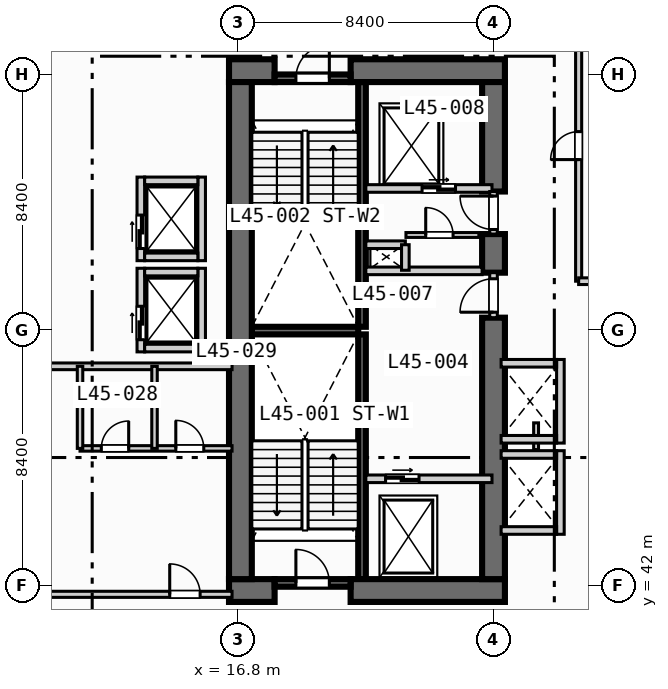
"""IFC4 building model, lengths in metres.
Left out: names, types, materials, properties, quantities, classifications, styles, units other than length and angle.
Written with IfcOpenShell. Run it as: python <this file> out.ifc"""

import sys

from ifc_helpers import new_model, si_unit, direction, frame, frame_2d, origin, place, context, subcontext, project, spatial, rectangle, extrude, element, fill, save


model = new_model("IFC4")
c1 = context("Model", 3, precision=1e-05, world=origin(), true_north=direction((0.0, 1.0)))
c2 = subcontext(c1, "Body", "Model", "MODEL_VIEW")
j1 = project(units=[si_unit("LENGTHUNIT", "METRE"), si_unit("PLANEANGLEUNIT", "RADIAN")], contexts=[c1])
p1 = place(None, origin())
s1 = spatial("IfcSite", under=j1, at=p1, CompositionType="ELEMENT")
p2 = place(p1, origin())
s2 = spatial("IfcBuilding", under=s1, at=p2, CompositionType="ELEMENT")
p3 = place(p2, frame((0.0, 0.0, 186.5)))
s3 = spatial("IfcBuildingStorey", under=s2, at=p3, CompositionType="ELEMENT", Elevation=186.5)
for number, where, z_axis, x_axis in (
    (1, (20.875, 42.2, 0.0), (0.0, 0.0, 1.0), (0.0, 1.0, 0.0)),
    (2, (20.875, 50.5, 0.0), (0.0, 0.0, 1.0), (0.0, 1.0, 0.0)),
):
    element("IfcWall", number, at=place(p3, frame(where, z_axis=z_axis, x_axis=x_axis)), inside=s3, PredefinedType="SOLIDWALL", context=c2, shape_type="SweptSolid", body=[
        extrude(rectangle(XDim=8.05, YDim=0.25, at=frame_2d((4.025, 0.0))), origin(), (0.0, 0.0, 1.0), 3.47),
    ])
p4 = place(p3, frame((17.25, 50.375, 0.0), z_axis=(0.0, 0.0, 1.0), x_axis=(1.0, 0.0, 0.0)))
e3 = element("IfcWall", 3, at=p4, inside=s3, PredefinedType="SOLIDWALL", context=c2, shape_type="SweptSolid", body=[
    extrude(rectangle(XDim=3.5, YDim=0.25, at=frame_2d((1.75, 0.0))), origin(), (0.0, 0.0, 1.0), 3.47),
])
p5 = place(p3, frame((16.5, 41.825, 0.0), z_axis=(0.0, 0.0, 1.0), x_axis=(1.0, 0.0, 0.0)))
e4 = element("IfcWall", 4, at=p5, inside=s3, PredefinedType="SHEAR", context=c2, shape_type="SweptSolid", body=[
    extrude(rectangle(XDim=1.5, YDim=0.75, at=frame_2d((0.75, 0.0))), origin(), (0.0, 0.0, 1.0), 3.47),
])
p6 = place(p3, frame((20.5, 41.825, 0.0), z_axis=(0.0, 0.0, 1.0), x_axis=(1.0, 0.0, 0.0)))
e5 = element("IfcWall", 5, at=p6, inside=s3, PredefinedType="SHEAR", context=c2, shape_type="SweptSolid", body=[
    extrude(rectangle(XDim=5.075, YDim=0.75, at=frame_2d((2.538, 0.0))), origin(), (0.0, 0.0, 1.0), 3.47),
])
p7 = place(p3, frame((16.5, 58.925, 0.0), z_axis=(0.0, 0.0, 1.0), x_axis=(1.0, 0.0, 0.0)))
e6 = element("IfcWall", 6, at=p7, inside=s3, PredefinedType="SHEAR", context=c2, shape_type="SweptSolid", body=[
    extrude(rectangle(XDim=1.5, YDim=0.75, at=frame_2d((0.75, 0.0))), origin(), (0.0, 0.0, 1.0), 3.47),
])
p8 = place(p3, frame((20.5, 58.925, 0.0), z_axis=(0.0, 0.0, 1.0), x_axis=(1.0, 0.0, 0.0)))
e7 = element("IfcWall", 7, at=p8, inside=s3, PredefinedType="SHEAR", context=c2, shape_type="SweptSolid", body=[
    extrude(rectangle(XDim=5.075, YDim=0.75, at=frame_2d((2.538, 0.0))), origin(), (0.0, 0.0, 1.0), 3.47),
])
p9 = place(p3, frame((16.875, 42.2, 0.0), z_axis=(0.0, 0.0, 1.0), x_axis=(0.0, 1.0, 0.0)))
e8 = element("IfcWall", 8, at=p9, inside=s3, PredefinedType="SHEAR", context=c2, shape_type="SweptSolid", body=[
    extrude(rectangle(XDim=16.35, YDim=0.75, at=frame_2d((8.175, 0.0))), origin(), (0.0, 0.0, 1.0), 3.47),
])
p10 = place(p3, frame((25.2, 42.2, 0.0), z_axis=(0.0, 0.0, 1.0), x_axis=(0.0, 1.0, 0.0)))
e9 = element("IfcWall", 9, at=p10, inside=s3, PredefinedType="SHEAR", context=c2, shape_type="SweptSolid", body=[
    extrude(rectangle(XDim=8.6, YDim=0.75, at=frame_2d((4.3, 0.0))), origin(), (0.0, 0.0, 1.0), 3.47),
])
p11 = place(p3, frame((25.2, 52.28, 0.0), z_axis=(0.0, 0.0, 1.0), x_axis=(0.0, 1.0, 0.0)))
e10 = element("IfcWall", 10, at=p11, inside=s3, PredefinedType="SHEAR", context=c2, shape_type="SweptSolid", body=[
    extrude(rectangle(XDim=1.27, YDim=0.75, at=frame_2d((0.635, 0.0))), origin(), (0.0, 0.0, 1.0), 3.47),
])
p12 = place(p3, frame((25.2, 54.95, 0.0), z_axis=(0.0, 0.0, 1.0), x_axis=(0.0, 1.0, 0.0)))
e11 = element("IfcWall", 11, at=p12, inside=s3, PredefinedType="SHEAR", context=c2, shape_type="SweptSolid", body=[
    extrude(rectangle(XDim=3.6, YDim=0.75, at=frame_2d((1.8, 0.0))), origin(), (0.0, 0.0, 1.0), 3.47),
])
p13 = place(p3, frame((18.0, 42.075, 0.0), z_axis=(0.0, 0.0, 1.0), x_axis=(1.0, 0.0, 0.0)))
e12 = element("IfcWall", 12, at=p13, inside=s3, PredefinedType="SOLIDWALL", context=c2, shape_type="SweptSolid", body=[
    extrude(rectangle(XDim=2.5, YDim=0.25, at=frame_2d((1.25, 0.0))), origin(), (0.0, 0.0, 1.0), 3.47),
])
p14 = place(p13, frame((0.7, 0.0, 0.0)))
e13 = element("IfcOpeningElement", 13, at=p14, cuts=e12, PredefinedType="OPENING", context=c2, shape_type="SweptSolid", body=[
    extrude(rectangle(XDim=1.1, YDim=2.15, at=frame_2d((0.55, 1.075))), frame((0.0, 0.135, 0.0), z_axis=(0.0, -1.0, 0.0), x_axis=(1.0, 0.0, 0.0)), (0.0, 0.0, 1.0), 0.27),
])
p15 = place(p3, frame((18.0, 58.675, 0.0), z_axis=(0.0, 0.0, 1.0), x_axis=(1.0, 0.0, 0.0)))
e14 = element("IfcWall", 14, at=p15, inside=s3, PredefinedType="SOLIDWALL", context=c2, shape_type="SweptSolid", body=[
    extrude(rectangle(XDim=2.5, YDim=0.25, at=frame_2d((1.25, 0.0))), origin(), (0.0, 0.0, 1.0), 3.47),
])
p16 = place(p15, frame((0.7, 0.0, 0.0)))
e15 = element("IfcOpeningElement", 15, at=p16, cuts=e14, PredefinedType="OPENING", context=c2, shape_type="SweptSolid", body=[
    extrude(rectangle(XDim=1.1, YDim=2.15, at=frame_2d((0.55, 1.075))), frame((0.0, 0.135, 0.0), z_axis=(0.0, -1.0, 0.0), x_axis=(1.0, 0.0, 0.0)), (0.0, 0.0, 1.0), 0.27),
])
p17 = place(p3, frame((21.0, 45.5, 0.0), z_axis=(0.0, 0.0, 1.0), x_axis=(1.0, 0.0, 0.0)))
e16 = element("IfcWall", 16, at=p17, inside=s3, PredefinedType="SOLIDWALL", context=c2, shape_type="SweptSolid", body=[
    extrude(rectangle(XDim=4.15, YDim=0.25, at=frame_2d((2.075, 0.0))), origin(), (0.0, 0.0, 1.0), 3.47),
])
p18 = place(p17, frame((0.65, 0.0, 0.0)))
e17 = element("IfcOpeningElement", 17, at=p18, cuts=e16, PredefinedType="OPENING", context=c2, shape_type="SweptSolid", body=[
    extrude(rectangle(XDim=1.1, YDim=2.15, at=frame_2d((0.55, 1.075))), frame((0.0, 0.135, 0.0), z_axis=(0.0, -1.0, 0.0), x_axis=(1.0, 0.0, 0.0)), (0.0, 0.0, 1.0), 0.27),
])
p19 = place(p3, frame((25.2, 50.8, 0.0), z_axis=(0.0, 0.0, 1.0), x_axis=(0.0, 1.0, 0.0)))
e18 = element("IfcWall", 18, at=p19, inside=s3, PredefinedType="SOLIDWALL", context=c2, shape_type="SweptSolid", body=[
    extrude(rectangle(XDim=1.48, YDim=0.25, at=frame_2d((0.74, 0.0))), origin(), (0.0, 0.0, 1.0), 3.47),
])
p20 = place(p19, frame((0.18, 0.0, 0.0)))
e19 = element("IfcOpeningElement", 19, at=p20, cuts=e18, PredefinedType="OPENING", context=c2, shape_type="SweptSolid", body=[
    extrude(rectangle(XDim=1.1, YDim=2.15, at=frame_2d((0.55, 1.075))), frame((0.0, 0.135, 0.0), z_axis=(0.0, -1.0, 0.0), x_axis=(1.0, 0.0, 0.0)), (0.0, 0.0, 1.0), 0.27),
])
p21 = place(p3, frame((21.0, 52.34, 0.0), z_axis=(0.0, 0.0, 1.0), x_axis=(1.0, 0.0, 0.0)))
e20 = element("IfcWall", 20, at=p21, inside=s3, PredefinedType="SOLIDWALL", context=c2, shape_type="SweptSolid", body=[
    extrude(rectangle(XDim=3.825, YDim=0.25, at=frame_2d((1.913, 0.0))), origin(), (0.0, 0.0, 1.0), 3.47),
])
p22 = place(p3, frame((21.0, 55.05, 0.0), z_axis=(0.0, 0.0, 1.0), x_axis=(1.0, 0.0, 0.0)))
e21 = element("IfcWall", 21, at=p22, inside=s3, PredefinedType="SOLIDWALL", context=c2, shape_type="SweptSolid", body=[
    extrude(rectangle(XDim=4.15, YDim=0.25, at=frame_2d((2.075, 0.0))), origin(), (0.0, 0.0, 1.0), 3.47),
])
p23 = place(p22, frame((1.85, 0.0, 0.0)))
e22 = element("IfcOpeningElement", 22, at=p23, cuts=e21, PredefinedType="OPENING", context=c2, shape_type="SweptSolid", body=[
    extrude(rectangle(XDim=1.1, YDim=2.15, at=frame_2d((0.55, 1.075))), frame((0.0, 0.135, 0.0), z_axis=(0.0, -1.0, 0.0), x_axis=(1.0, 0.0, 0.0)), (0.0, 0.0, 1.0), 0.27),
])
p24 = place(p3, frame((25.2, 53.55, 0.0), z_axis=(0.0, 0.0, 1.0), x_axis=(0.0, 1.0, 0.0)))
e23 = element("IfcWall", 23, at=p24, inside=s3, PredefinedType="SOLIDWALL", context=c2, shape_type="SweptSolid", body=[
    extrude(rectangle(XDim=1.4, YDim=0.25, at=frame_2d((0.7, 0.0))), origin(), (0.0, 0.0, 1.0), 3.47),
])
p25 = place(p24, frame((0.15, 0.0, 0.0)))
e24 = element("IfcOpeningElement", 24, at=p25, cuts=e23, PredefinedType="OPENING", context=c2, shape_type="SweptSolid", body=[
    extrude(rectangle(XDim=1.1, YDim=2.15, at=frame_2d((0.55, 1.075))), frame((0.0, 0.135, 0.0), z_axis=(0.0, -1.0, 0.0), x_axis=(1.0, 0.0, 0.0)), (0.0, 0.0, 1.0), 0.27),
])
p26 = place(p3, frame((21.0, 53.2, 0.0), z_axis=(0.0, 0.0, 1.0), x_axis=(1.0, 0.0, 0.0)))
e25 = element("IfcWall", 25, at=p26, inside=s3, PredefinedType="SOLIDWALL", context=c2, shape_type="SweptSolid", body=[
    extrude(rectangle(XDim=1.3, YDim=0.25, at=frame_2d((0.65, 0.0))), origin(), (0.0, 0.0, 1.0), 3.47),
])
p27 = place(p3, frame((22.3, 52.36, 0.0), z_axis=(0.0, 0.0, 1.0), x_axis=(0.0, 1.0, 0.0)))
e26 = element("IfcWall", 26, at=p27, inside=s3, PredefinedType="SOLIDWALL", context=c2, shape_type="SweptSolid", body=[
    extrude(rectangle(XDim=0.84, YDim=0.25, at=frame_2d((0.42, 0.0))), origin(), (0.0, 0.0, 1.0), 3.47),
])
p28 = place(p3, frame((22.32, 53.52, 0.0), z_axis=(0.0, 0.0, 1.0), x_axis=(1.0, 0.0, 0.0)))
e27 = element("IfcWall", 27, at=p28, inside=s3, PredefinedType="PARTITIONING", context=c2, shape_type="SweptSolid", body=[
    extrude(rectangle(XDim=2.4, YDim=0.16, at=frame_2d((1.2, 0.0))), origin(), (0.0, 0.0, 1.0), 3.47),
])
p29 = place(p28, frame((0.65, 0.0, 0.0)))
e28 = element("IfcOpeningElement", 28, at=p29, cuts=e27, PredefinedType="OPENING", context=c2, shape_type="SweptSolid", body=[
    extrude(rectangle(XDim=0.9, YDim=2.1, at=frame_2d((0.45, 1.05))), frame((0.0, 0.09, 0.0), z_axis=(0.0, -1.0, 0.0), x_axis=(1.0, 0.0, 0.0)), (0.0, 0.0, 1.0), 0.18),
])
p30 = place(p3, frame((13.6, 49.675, 0.0), z_axis=(0.0, 0.0, 1.0), x_axis=(0.0, 1.0, 0.0)))
e29 = element("IfcWall", 29, at=p30, inside=s3, PredefinedType="SOLIDWALL", context=c2, shape_type="SweptSolid", body=[
    extrude(rectangle(XDim=2.75, YDim=0.25, at=frame_2d((1.375, 0.0))), origin(), (0.0, 0.0, 1.0), 3.47),
])
p31 = place(p30, frame((0.4, 0.0, 0.0)))
e30 = element("IfcOpeningElement", 30, at=p31, cuts=e29, PredefinedType="OPENING", context=c2, shape_type="SweptSolid", body=[
    extrude(rectangle(XDim=1.1, YDim=2.15, at=frame_2d((0.55, 1.075))), frame((0.0, 0.135, 0.0), z_axis=(0.0, -1.0, 0.0), x_axis=(1.0, 0.0, 0.0)), (0.0, 0.0, 1.0), 0.27),
])
p32 = place(p3, frame((15.6, 49.675, 0.0), z_axis=(0.0, 0.0, 1.0), x_axis=(0.0, 1.0, 0.0)))
e31 = element("IfcWall", 31, at=p32, inside=s3, PredefinedType="SOLIDWALL", context=c2, shape_type="SweptSolid", body=[
    extrude(rectangle(XDim=2.75, YDim=0.25, at=frame_2d((1.375, 0.0))), origin(), (0.0, 0.0, 1.0), 3.47),
])
for number, where, z_axis, x_axis in (
    (32, (13.725, 49.8, 0.0), (0.0, 0.0, 1.0), (1.0, 0.0, 0.0)),
    (33, (13.725, 52.3, 0.0), (0.0, 0.0, 1.0), (1.0, 0.0, 0.0)),
):
    element("IfcWall", number, at=place(p3, frame(where, z_axis=z_axis, x_axis=x_axis)), inside=s3, PredefinedType="SOLIDWALL", context=c2, shape_type="SweptSolid", body=[
        extrude(rectangle(XDim=1.75, YDim=0.25, at=frame_2d((0.875, 0.0))), origin(), (0.0, 0.0, 1.0), 3.47),
    ])
p33 = place(p3, frame((13.6, 52.675, 0.0), z_axis=(0.0, 0.0, 1.0), x_axis=(0.0, 1.0, 0.0)))
e34 = element("IfcWall", 34, at=p33, inside=s3, PredefinedType="SOLIDWALL", context=c2, shape_type="SweptSolid", body=[
    extrude(rectangle(XDim=2.75, YDim=0.25, at=frame_2d((1.375, 0.0))), origin(), (0.0, 0.0, 1.0), 3.47),
])
p34 = place(p33, frame((0.4, 0.0, 0.0)))
e35 = element("IfcOpeningElement", 35, at=p34, cuts=e34, PredefinedType="OPENING", context=c2, shape_type="SweptSolid", body=[
    extrude(rectangle(XDim=1.1, YDim=2.15, at=frame_2d((0.55, 1.075))), frame((0.0, 0.135, 0.0), z_axis=(0.0, -1.0, 0.0), x_axis=(1.0, 0.0, 0.0)), (0.0, 0.0, 1.0), 0.27),
])
p35 = place(p3, frame((15.6, 52.675, 0.0), z_axis=(0.0, 0.0, 1.0), x_axis=(0.0, 1.0, 0.0)))
e36 = element("IfcWall", 36, at=p35, inside=s3, PredefinedType="SOLIDWALL", context=c2, shape_type="SweptSolid", body=[
    extrude(rectangle(XDim=2.75, YDim=0.25, at=frame_2d((1.375, 0.0))), origin(), (0.0, 0.0, 1.0), 3.47),
])
for number, where, z_axis, x_axis in (
    (37, (13.725, 52.8, 0.0), (0.0, 0.0, 1.0), (1.0, 0.0, 0.0)),
    (38, (13.725, 55.3, 0.0), (0.0, 0.0, 1.0), (1.0, 0.0, 0.0)),
):
    element("IfcWall", number, at=place(p3, frame(where, z_axis=z_axis, x_axis=x_axis)), inside=s3, PredefinedType="SOLIDWALL", context=c2, shape_type="SweptSolid", body=[
        extrude(rectangle(XDim=1.75, YDim=0.25, at=frame_2d((0.875, 0.0))), origin(), (0.0, 0.0, 1.0), 3.47),
    ])
p36 = place(p3, frame((27.4, 43.675, 0.0), z_axis=(0.0, 0.0, 1.0), x_axis=(0.0, 1.0, 0.0)))
e39 = element("IfcWall", 39, at=p36, inside=s3, PredefinedType="SOLIDWALL", context=c2, shape_type="SweptSolid", body=[
    extrude(rectangle(XDim=2.75, YDim=0.25, at=frame_2d((1.375, 0.0))), origin(), (0.0, 0.0, 1.0), 3.47),
])
for number, where, z_axis, x_axis in (
    (40, (25.45, 43.8, 0.0), (0.0, 0.0, 1.0), (1.0, 0.0, 0.0)),
    (41, (25.45, 46.3, 0.0), (0.0, 0.0, 1.0), (1.0, 0.0, 0.0)),
):
    element("IfcWall", number, at=place(p3, frame(where, z_axis=z_axis, x_axis=x_axis)), inside=s3, PredefinedType="SOLIDWALL", context=c2, shape_type="SweptSolid", body=[
        extrude(rectangle(XDim=1.825, YDim=0.25, at=frame_2d((0.913, 0.0))), origin(), (0.0, 0.0, 1.0), 3.47),
    ])
p37 = place(p3, frame((26.6, 46.46, 0.0), z_axis=(0.0, 0.0, 1.0), x_axis=(0.0, 1.0, 0.0)))
e42 = element("IfcWall", 42, at=p37, inside=s3, PredefinedType="PARTITIONING", context=c2, shape_type="SweptSolid", body=[
    extrude(rectangle(XDim=0.88, YDim=0.16, at=frame_2d((0.44, 0.0))), origin(), (0.0, 0.0, 1.0), 3.47),
])
p38 = place(p3, frame((27.4, 46.675, 0.0), z_axis=(0.0, 0.0, 1.0), x_axis=(0.0, 1.0, 0.0)))
e43 = element("IfcWall", 43, at=p38, inside=s3, PredefinedType="SOLIDWALL", context=c2, shape_type="SweptSolid", body=[
    extrude(rectangle(XDim=2.75, YDim=0.25, at=frame_2d((1.375, 0.0))), origin(), (0.0, 0.0, 1.0), 3.47),
])
for number, where, z_axis, x_axis in (
    (44, (25.45, 46.8, 0.0), (0.0, 0.0, 1.0), (1.0, 0.0, 0.0)),
    (45, (25.45, 49.3, 0.0), (0.0, 0.0, 1.0), (1.0, 0.0, 0.0)),
):
    element("IfcWall", number, at=place(p3, frame(where, z_axis=z_axis, x_axis=x_axis)), inside=s3, PredefinedType="SOLIDWALL", context=c2, shape_type="SweptSolid", body=[
        extrude(rectangle(XDim=1.825, YDim=0.25, at=frame_2d((0.913, 0.0))), origin(), (0.0, 0.0, 1.0), 3.47),
    ])
p39 = place(p3, frame((0.35, 41.7, 0.0), z_axis=(0.0, 0.0, 1.0), x_axis=(1.0, 0.0, 0.0)))
e46 = element("IfcWall", 46, at=p39, inside=s3, PredefinedType="PARTITIONING", context=c2, shape_type="SweptSolid", body=[
    extrude(rectangle(XDim=16.25, YDim=0.2, at=frame_2d((8.125, 0.0))), origin(), (0.0, 0.0, 1.0), 2.82),
])
p40 = place(p39, frame((14.2, 0.0, 0.0)))
e47 = element("IfcOpeningElement", 47, at=p40, cuts=e46, PredefinedType="OPENING", context=c2, shape_type="SweptSolid", body=[
    extrude(rectangle(XDim=1.0, YDim=2.15, at=frame_2d((0.5, 1.075))), frame((0.0, 0.11, 0.0), z_axis=(0.0, -1.0, 0.0), x_axis=(1.0, 0.0, 0.0)), (0.0, 0.0, 1.0), 0.22),
])
p41 = place(p3, frame((0.35, 49.2, 0.0), z_axis=(0.0, 0.0, 1.0), x_axis=(1.0, 0.0, 0.0)))
e48 = element("IfcWall", 48, at=p41, inside=s3, PredefinedType="PARTITIONING", context=c2, shape_type="SweptSolid", body=[
    extrude(rectangle(XDim=16.25, YDim=0.22, at=frame_2d((8.125, 0.0))), origin(), (0.0, 0.0, 1.0), 3.47),
])
p42 = place(p3, frame((11.6, 46.5, 0.0), z_axis=(0.0, 0.0, 1.0), x_axis=(1.0, 0.0, 0.0)))
e49 = element("IfcWall", 49, at=p42, inside=s3, PredefinedType="PLUMBINGWALL", context=c2, shape_type="SweptSolid", body=[
    extrude(rectangle(XDim=5.0, YDim=0.18, at=frame_2d((2.5, 0.0))), origin(), (0.0, 0.0, 1.0), 3.47),
])
p43 = place(p42, frame((0.7, 0.0, 0.0)))
e50 = element("IfcOpeningElement", 50, at=p43, cuts=e49, PredefinedType="OPENING", context=c2, shape_type="SweptSolid", body=[
    extrude(rectangle(XDim=0.9, YDim=2.1, at=frame_2d((0.45, 1.05))), frame((0.0, 0.1, 0.0), z_axis=(0.0, -1.0, 0.0), x_axis=(1.0, 0.0, 0.0)), (0.0, 0.0, 1.0), 0.2),
])
p44 = place(p42, frame((3.15, 0.0, 0.0)))
e51 = element("IfcOpeningElement", 51, at=p44, cuts=e49, PredefinedType="OPENING", context=c2, shape_type="SweptSolid", body=[
    extrude(rectangle(XDim=0.92, YDim=2.1, at=frame_2d((0.46, 1.05))), frame((0.0, 0.1, 0.0), z_axis=(0.0, -1.0, 0.0), x_axis=(1.0, 0.0, 0.0)), (0.0, 0.0, 1.0), 0.2),
])
for number, where, z_axis, x_axis in (
    (52, (11.6, 46.5, 0.0), (0.0, 0.0, 1.0), (0.0, 1.0, 0.0)),
    (53, (14.05, 46.5, 0.0), (0.0, 0.0, 1.0), (0.0, 1.0, 0.0)),
):
    element("IfcWall", number, at=place(p3, frame(where, z_axis=z_axis, x_axis=x_axis)), inside=s3, PredefinedType="PLUMBINGWALL", context=c2, shape_type="SweptSolid", body=[
        extrude(rectangle(XDim=2.7, YDim=0.18, at=frame_2d((1.35, 0.0))), origin(), (0.0, 0.0, 1.0), 3.47),
    ])
p45 = place(p3, frame((28.0, 52.0, 0.0), z_axis=(0.0, 0.0, 1.0), x_axis=(0.0, 1.0, 0.0)))
e54 = element("IfcWall", 54, at=p45, inside=s3, PredefinedType="PARTITIONING", context=c2, shape_type="SweptSolid", body=[
    extrude(rectangle(XDim=20.2, YDim=0.2, at=frame_2d((10.1, 0.0))), origin(), (0.0, 0.0, 1.0), 3.47),
])
p46 = place(p45, frame((4.0, 0.0, 0.0)))
e55 = element("IfcOpeningElement", 55, at=p46, cuts=e54, PredefinedType="OPENING", context=c2, shape_type="SweptSolid", body=[
    extrude(rectangle(XDim=0.92, YDim=2.1, at=frame_2d((0.46, 1.05))), frame((0.0, 0.11, 0.0), z_axis=(0.0, -1.0, 0.0), x_axis=(1.0, 0.0, 0.0)), (0.0, 0.0, 1.0), 0.22),
])
p47 = place(p3, frame((28.0, 52.0, 0.0), z_axis=(0.0, 0.0, 1.0), x_axis=(1.0, 0.0, 0.0)))
e56 = element("IfcWall", 56, at=p47, inside=s3, PredefinedType="PARTITIONING", context=c2, shape_type="SweptSolid", body=[
    extrude(rectangle(XDim=5.3, YDim=0.22, at=frame_2d((2.65, 0.0))), origin(), (0.0, 0.0, 1.0), 3.47),
])
p48 = place(p14, origin())
e57 = element("IfcDoor", 57, at=p48, inside=s3, OperationType="SINGLE_SWING_LEFT", PredefinedType="DOOR", context=c2, shape_type="SweptSolid", body=[
    extrude(rectangle(XDim=1.1, YDim=2.15, at=frame_2d((0.55, 1.075))), frame((0.0, 0.025, 0.0), z_axis=(0.0, -1.0, 0.0), x_axis=(1.0, 0.0, 0.0)), (0.0, 0.0, 1.0), 0.05),
])
fill(e13, e57)
p49 = place(p16, origin())
e58 = element("IfcDoor", 58, at=p49, inside=s3, OperationType="SINGLE_SWING_RIGHT", PredefinedType="DOOR", context=c2, shape_type="SweptSolid", body=[
    extrude(rectangle(XDim=1.1, YDim=2.15, at=frame_2d((0.55, 1.075))), frame((0.0, 0.025, 0.0), z_axis=(0.0, -1.0, 0.0), x_axis=(1.0, 0.0, 0.0)), (0.0, 0.0, 1.0), 0.05),
])
fill(e15, e58)
p50 = place(p18, origin())
e59 = element("IfcDoor", 59, at=p50, inside=s3, OperationType="SLIDING_TO_LEFT", PredefinedType="DOOR", context=c2, shape_type="SweptSolid", body=[
    extrude(rectangle(XDim=1.1, YDim=2.15, at=frame_2d((0.55, 1.075))), frame((0.0, 0.025, 0.0), z_axis=(0.0, -1.0, 0.0), x_axis=(1.0, 0.0, 0.0)), (0.0, 0.0, 1.0), 0.05),
])
fill(e17, e59)
p51 = place(p20, origin())
e60 = element("IfcDoor", 60, at=p51, inside=s3, OperationType="SINGLE_SWING_LEFT", PredefinedType="DOOR", context=c2, shape_type="SweptSolid", body=[
    extrude(rectangle(XDim=1.1, YDim=2.15, at=frame_2d((0.55, 1.075))), frame((0.0, 0.025, 0.0), z_axis=(0.0, -1.0, 0.0), x_axis=(1.0, 0.0, 0.0)), (0.0, 0.0, 1.0), 0.05),
])
fill(e19, e60)
p52 = place(p23, origin())
e61 = element("IfcDoor", 61, at=p52, inside=s3, OperationType="SLIDING_TO_LEFT", PredefinedType="DOOR", context=c2, shape_type="SweptSolid", body=[
    extrude(rectangle(XDim=1.1, YDim=2.15, at=frame_2d((0.55, 1.075))), frame((0.0, 0.025, 0.0), z_axis=(0.0, -1.0, 0.0), x_axis=(1.0, 0.0, 0.0)), (0.0, 0.0, 1.0), 0.05),
])
fill(e22, e61)
p53 = place(p25, origin())
e62 = element("IfcDoor", 62, at=p53, inside=s3, OperationType="SINGLE_SWING_RIGHT", PredefinedType="DOOR", context=c2, shape_type="SweptSolid", body=[
    extrude(rectangle(XDim=1.1, YDim=2.15, at=frame_2d((0.55, 1.075))), frame((0.0, 0.025, 0.0), z_axis=(0.0, -1.0, 0.0), x_axis=(1.0, 0.0, 0.0)), (0.0, 0.0, 1.0), 0.05),
])
fill(e24, e62)
p54 = place(p29, origin())
e63 = element("IfcDoor", 63, at=p54, inside=s3, OperationType="SINGLE_SWING_LEFT", PredefinedType="DOOR", context=c2, shape_type="SweptSolid", body=[
    extrude(rectangle(XDim=0.9, YDim=2.1, at=frame_2d((0.45, 1.05))), frame((0.0, 0.025, 0.0), z_axis=(0.0, -1.0, 0.0), x_axis=(1.0, 0.0, 0.0)), (0.0, 0.0, 1.0), 0.05),
])
fill(e28, e63)
p55 = place(p31, origin())
e64 = element("IfcDoor", 64, at=p55, inside=s3, OperationType="SLIDING_TO_LEFT", PredefinedType="DOOR", context=c2, shape_type="SweptSolid", body=[
    extrude(rectangle(XDim=1.1, YDim=2.15, at=frame_2d((0.55, 1.075))), frame((0.0, 0.025, 0.0), z_axis=(0.0, -1.0, 0.0), x_axis=(1.0, 0.0, 0.0)), (0.0, 0.0, 1.0), 0.05),
])
fill(e30, e64)
p56 = place(p34, origin())
e65 = element("IfcDoor", 65, at=p56, inside=s3, OperationType="SLIDING_TO_LEFT", PredefinedType="DOOR", context=c2, shape_type="SweptSolid", body=[
    extrude(rectangle(XDim=1.1, YDim=2.15, at=frame_2d((0.55, 1.075))), frame((0.0, 0.025, 0.0), z_axis=(0.0, -1.0, 0.0), x_axis=(1.0, 0.0, 0.0)), (0.0, 0.0, 1.0), 0.05),
])
fill(e35, e65)
p57 = place(p40, origin())
e66 = element("IfcDoor", 66, at=p57, inside=s3, OperationType="SINGLE_SWING_LEFT", PredefinedType="DOOR", context=c2, shape_type="SweptSolid", body=[
    extrude(rectangle(XDim=1.0, YDim=2.15, at=frame_2d((0.5, 1.075))), frame((0.0, 0.025, 0.0), z_axis=(0.0, -1.0, 0.0), x_axis=(1.0, 0.0, 0.0)), (0.0, 0.0, 1.0), 0.05),
])
fill(e47, e66)
p58 = place(p43, origin())
e67 = element("IfcDoor", 67, at=p58, inside=s3, OperationType="SINGLE_SWING_RIGHT", PredefinedType="DOOR", context=c2, shape_type="SweptSolid", body=[
    extrude(rectangle(XDim=0.9, YDim=2.1, at=frame_2d((0.45, 1.05))), frame((0.0, 0.025, 0.0), z_axis=(0.0, -1.0, 0.0), x_axis=(1.0, 0.0, 0.0)), (0.0, 0.0, 1.0), 0.05),
])
fill(e50, e67)
p59 = place(p44, origin())
e68 = element("IfcDoor", 68, at=p59, inside=s3, OperationType="SINGLE_SWING_LEFT", PredefinedType="DOOR", context=c2, shape_type="SweptSolid", body=[
    extrude(rectangle(XDim=0.92, YDim=2.1, at=frame_2d((0.46, 1.05))), frame((0.0, 0.025, 0.0), z_axis=(0.0, -1.0, 0.0), x_axis=(1.0, 0.0, 0.0)), (0.0, 0.0, 1.0), 0.05),
])
fill(e51, e68)
p60 = place(p46, origin())
e69 = element("IfcDoor", 69, at=p60, inside=s3, OperationType="SINGLE_SWING_LEFT", PredefinedType="DOOR", context=c2, shape_type="SweptSolid", body=[
    extrude(rectangle(XDim=0.92, YDim=2.1, at=frame_2d((0.46, 1.05))), frame((0.0, 0.025, 0.0), z_axis=(0.0, -1.0, 0.0), x_axis=(1.0, 0.0, 0.0)), (0.0, 0.0, 1.0), 0.05),
])
fill(e55, e69)
save(model, sys.argv[1])
